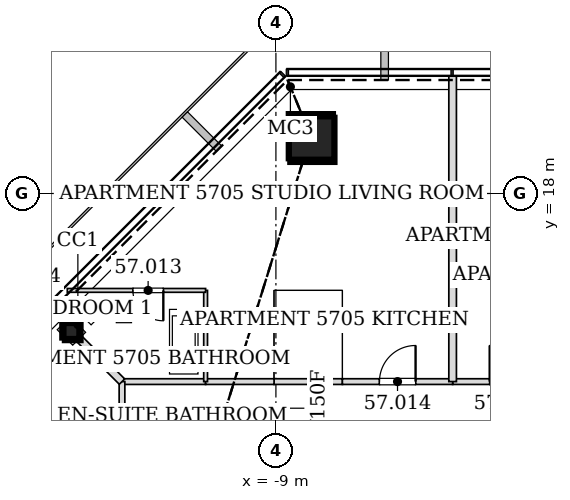
"""IFC4 building model, lengths in metres.
Left out: names, types, materials, properties, quantities, classifications, styles, units other than length and angle.
Written with IfcOpenShell. Run it as: python <this file> out.ifc"""

import sys

from ifc_helpers import new_model, si_unit, direction, frame, frame_2d, origin, origin_2d, place, context, subcontext, project, spatial, rectangle, hollow_rectangle, extrude, element, fill, save


model = new_model("IFC4")
c1 = context("Model", 3, precision=1e-05, world=origin(), true_north=direction((0.0, 1.0)))
c2 = subcontext(c1, "Body", "Model", "MODEL_VIEW")
j1 = project(units=[si_unit("LENGTHUNIT", "METRE"), si_unit("PLANEANGLEUNIT", "RADIAN")], contexts=[c1])
p1 = place(None, origin())
s1 = spatial("IfcSite", under=j1, at=p1, CompositionType="ELEMENT")
p2 = place(p1, origin())
s2 = spatial("IfcBuilding", under=s1, at=p2, CompositionType="ELEMENT")
p3 = place(p2, frame((0.0, 0.0, 241.4)))
s3 = spatial("IfcBuildingStorey", under=s2, at=p3, CompositionType="ELEMENT", Elevation=241.4)
p4 = place(p3, frame((-8.08, 19.508, 0.0), z_axis=(0.011698403216, -0.028277121884, 0.999531666202), x_axis=(0.924045401938, 0.382282742426, 0.0)))
e1 = element("IfcColumn", 1, at=p4, inside=s3, PredefinedType="COLUMN", context=c2, shape_type="SweptSolid", body=[
    extrude(hollow_rectangle(XDim=1.2, YDim=1.2, WallThickness=0.055, at=origin_2d()), origin(), (0.0, 0.0, 1.0), 3.402),
])
p5 = place(p3, frame((-14.415, 14.415, 0.0), z_axis=(0.020024994503, -0.020024994503, 0.999598919162), x_axis=(0.707106781187, 0.707106781187, 0.0)))
e2 = element("IfcColumn", 2, at=p5, inside=s3, PredefinedType="COLUMN", context=c2, shape_type="SweptSolid", body=[
    extrude(hollow_rectangle(XDim=0.45, YDim=0.45, WallThickness=0.02, at=origin_2d()), origin(), (0.0, 0.0, 1.0), 3.402),
])
p6 = place(p3, frame((-1.449, 13.05, 0.0), z_axis=(0.0, 0.0, 1.0), x_axis=(-1.0, 0.0, 0.0)))
e3 = element("IfcWall", 3, at=p6, inside=s3, PredefinedType="PARTITIONING", context=c2, shape_type="SweptSolid", body=[
    extrude(rectangle(XDim=2.902, YDim=0.15, at=frame_2d((1.451, 0.0))), origin(), (0.0, 0.0, 1.0), 2.662),
])
p7 = place(p6, frame((0.976, 0.0, 0.0)))
e4 = element("IfcOpeningElement", 4, at=p7, cuts=e3, PredefinedType="OPENING", context=c2, shape_type="SweptSolid", body=[
    extrude(rectangle(XDim=0.95, YDim=2.1, at=frame_2d((0.475, 1.05))), frame((0.0, 0.085, 0.0), z_axis=(0.0, -1.0, 0.0), x_axis=(1.0, 0.0, 0.0)), (0.0, 0.0, 1.0), 0.17),
])
p8 = place(p3, frame((-10.849, 13.05, 0.0), z_axis=(0.0, 0.0, 1.0), x_axis=(-1.0, 0.0, 0.0)))
e5 = element("IfcWall", 5, at=p8, inside=s3, PredefinedType="PARTITIONING", context=c2, shape_type="SweptSolid", body=[
    extrude(rectangle(XDim=2.201, YDim=0.15, at=frame_2d((1.101, 0.0))), origin(), (0.0, 0.0, 1.0), 2.588),
])
p9 = place(p3, frame((-7.249, 13.05, 0.0), z_axis=(0.0, 0.0, 1.0), x_axis=(-1.0, 0.0, 0.0)))
e6 = element("IfcWall", 6, at=p9, inside=s3, PredefinedType="PARTITIONING", context=c2, shape_type="SweptSolid", body=[
    extrude(rectangle(XDim=1.802, YDim=0.15, at=frame_2d((0.901, 0.0))), origin(), (0.0, 0.0, 1.0), 2.662),
])
p10 = place(p3, frame((-9.049, 13.05, 0.0), z_axis=(0.0, 0.0, 1.0), x_axis=(-1.0, 0.0, 0.0)))
e7 = element("IfcWall", 7, at=p10, inside=s3, PredefinedType="PARTITIONING", context=c2, shape_type="SweptSolid", body=[
    extrude(rectangle(XDim=1.802, YDim=0.15, at=frame_2d((0.901, 0.0))), origin(), (0.0, 0.0, 1.0), 2.349),
])
p11 = place(p3, frame((-4.349, 13.05, 0.0), z_axis=(0.0, 0.0, 1.0), x_axis=(-1.0, 0.0, 0.0)))
e8 = element("IfcWall", 8, at=p11, inside=s3, PredefinedType="PARTITIONING", context=c2, shape_type="SweptSolid", body=[
    extrude(rectangle(XDim=2.902, YDim=0.15, at=frame_2d((1.451, 0.0))), origin(), (0.0, 0.0, 1.0), 2.662),
])
p12 = place(p11, frame((0.976, 0.0, 0.0)))
e9 = element("IfcOpeningElement", 9, at=p12, cuts=e8, PredefinedType="OPENING", context=c2, shape_type="SweptSolid", body=[
    extrude(rectangle(XDim=0.95, YDim=2.1, at=frame_2d((0.475, 1.05))), frame((0.0, 0.085, 0.0), z_axis=(0.0, -1.0, 0.0), x_axis=(1.0, 0.0, 0.0)), (0.0, 0.0, 1.0), 0.17),
])
p13 = place(p3, frame((-13.05, 13.05, 0.0), z_axis=(0.0, 0.0, 1.0), x_axis=(0.0, -1.0, 0.0)))
e10 = element("IfcWall", 10, at=p13, inside=s3, PredefinedType="PARTITIONING", context=c2, shape_type="SweptSolid", body=[
    extrude(rectangle(XDim=1.401, YDim=0.15, at=frame_2d((0.701, 0.0))), origin(), (0.0, 0.0, 1.0), 2.588),
])
p14 = place(p3, frame((-4.35, 21.091, 0.0), z_axis=(0.0, 0.0, 1.0), x_axis=(0.0, -1.0, 0.0)))
e11 = element("IfcWall", 11, at=p14, inside=s3, PredefinedType="PARTITIONING", context=c2, shape_type="SweptSolid", body=[
    extrude(rectangle(XDim=8.041, YDim=0.2, at=frame_2d((4.021, 0.0))), origin(), (0.0, 0.0, 1.0), 2.662),
])
p15 = place(p3, frame((-10.85, 13.05, 0.0), z_axis=(0.0, 0.0, 1.0), x_axis=(0.0, 1.0, 0.0)))
e12 = element("IfcWall", 12, at=p15, inside=s3, PredefinedType="PARTITIONING", context=c2, shape_type="SweptSolid", body=[
    extrude(rectangle(XDim=2.4, YDim=0.1, at=frame_2d((1.2, 0.0))), origin(), (0.0, 0.0, 1.0), 2.786),
])
p16 = place(p3, frame((-10.85, 15.45, 0.0), z_axis=(0.0, 0.0, 1.0), x_axis=(-1.0, 0.0, 0.0)))
e13 = element("IfcWall", 13, at=p16, inside=s3, PredefinedType="PARTITIONING", context=c2, shape_type="SweptSolid", body=[
    extrude(rectangle(XDim=3.639, YDim=0.1, at=frame_2d((1.82, 0.0))), origin(), (0.0, 0.0, 1.0), 2.784),
])
p17 = place(p16, frame((1.113, 0.0, 0.0)))
e14 = element("IfcOpeningElement", 14, at=p17, cuts=e13, PredefinedType="OPENING", context=c2, shape_type="SweptSolid", body=[
    extrude(rectangle(XDim=0.8, YDim=2.1, at=frame_2d((0.4, 1.05))), frame((0.0, 0.06, 0.0), z_axis=(0.0, -1.0, 0.0), x_axis=(1.0, 0.0, 0.0)), (0.0, 0.0, 1.0), 0.12),
])
p18 = place(p3, frame((-14.174, 14.174, 0.0), z_axis=(0.0, 0.0, 1.0), x_axis=(0.707106781187, -0.707106781187, 0.0)))
e15 = element("IfcWall", 15, at=p18, inside=s3, PredefinedType="PARTITIONING", context=c2, shape_type="SweptSolid", body=[
    extrude(rectangle(XDim=1.59, YDim=0.2, at=frame_2d((0.795, 0.0))), origin(), (0.0, 0.0, 1.0), 2.588),
])
p19 = place(p7, frame((0.95, 0.0, 0.0), z_axis=(0.0, 0.0, 1.0), x_axis=(-1.0, 0.0, 0.0)))
e16 = element("IfcDoor", 16, at=p19, inside=s3, OperationType="SINGLE_SWING_LEFT", PredefinedType="DOOR", context=c2, shape_type="SweptSolid", body=[
    extrude(rectangle(XDim=0.95, YDim=2.1, at=frame_2d((0.475, 1.05))), frame((0.0, 0.025, 0.0), z_axis=(0.0, -1.0, 0.0), x_axis=(1.0, 0.0, 0.0)), (0.0, 0.0, 1.0), 0.05),
])
fill(e4, e16)
p20 = place(p17, origin())
e17 = element("IfcDoor", 17, at=p20, inside=s3, OperationType="SINGLE_SWING_LEFT", PredefinedType="DOOR", context=c2, shape_type="SweptSolid", body=[
    extrude(rectangle(XDim=0.8, YDim=2.1, at=frame_2d((0.4, 1.05))), frame((0.0, 0.025, 0.0), z_axis=(0.0, -1.0, 0.0), x_axis=(1.0, 0.0, 0.0)), (0.0, 0.0, 1.0), 0.05),
])
fill(e14, e17)
p21 = place(p12, frame((0.95, 0.0, 0.0), z_axis=(0.0, 0.0, 1.0), x_axis=(-1.0, 0.0, 0.0)))
e18 = element("IfcDoor", 18, at=p21, inside=s3, OperationType="SINGLE_SWING_RIGHT", PredefinedType="DOOR", context=c2, shape_type="SweptSolid", body=[
    extrude(rectangle(XDim=0.95, YDim=2.1, at=frame_2d((0.475, 1.05))), frame((0.0, 0.025, 0.0), z_axis=(0.0, -1.0, 0.0), x_axis=(1.0, 0.0, 0.0)), (0.0, 0.0, 1.0), 0.05),
])
fill(e9, e18)
save(model, sys.argv[1])
